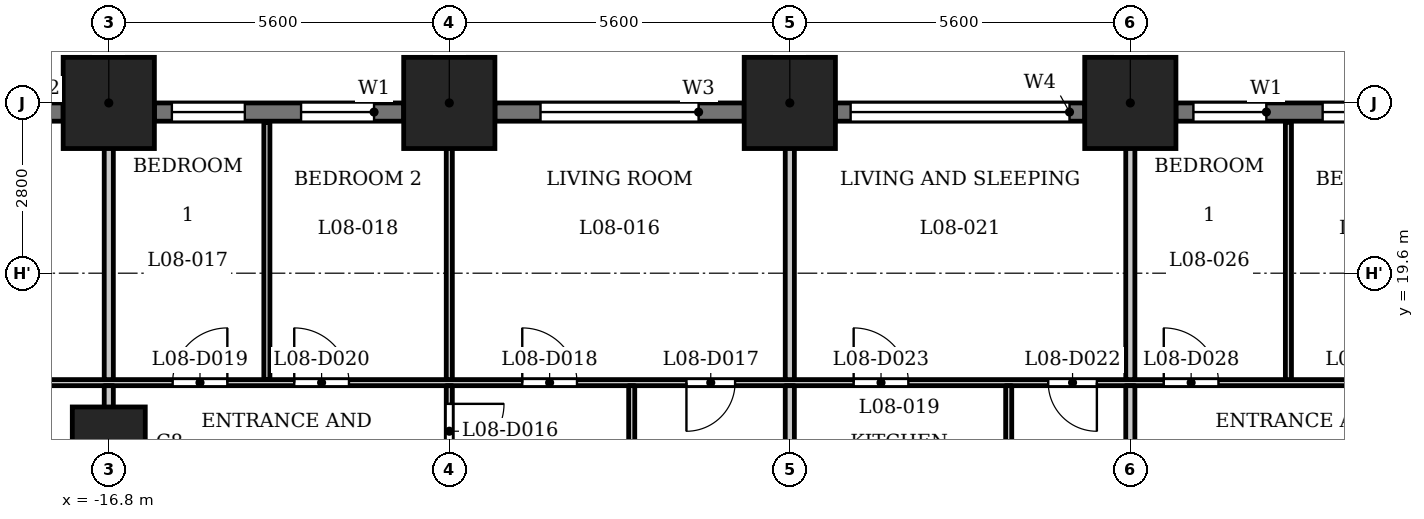
"""IFC4 building model, lengths in metres.
Left out: names, types, materials, properties, quantities, classifications, styles, units other than length and angle.
Written with IfcOpenShell. Run it as: python <this file> out.ifc"""

import sys

from ifc_helpers import new_model, si_unit, direction, frame, frame_2d, origin, origin_2d, place, context, subcontext, project, spatial, rectangle, extrude, element, fill, save


model = new_model("IFC4")
c1 = context("Model", 3, precision=1e-05, world=origin(), true_north=direction((0.0, 1.0)))
c2 = subcontext(c1, "Body", "Model", "MODEL_VIEW")
j1 = project(units=[si_unit("LENGTHUNIT", "METRE"), si_unit("PLANEANGLEUNIT", "RADIAN")], contexts=[c1])
p1 = place(None, origin())
s1 = spatial("IfcSite", under=j1, at=p1, CompositionType="ELEMENT")
p2 = place(p1, origin())
s2 = spatial("IfcBuilding", under=s1, at=p2, CompositionType="ELEMENT")
p3 = place(p2, frame((0.0, 0.0, 37.5)))
s3 = spatial("IfcBuildingStorey", under=s2, at=p3, CompositionType="ELEMENT", Elevation=37.5)
for number, where, z_axis, x_axis in (
    (1, (0.0, 22.4, 0.0), (0.0, 0.0, 1.0), (1.0, 0.0, 0.0)),
    (2, (-5.6, 22.4, 0.0), (0.0, 0.0, 1.0), (1.0, 0.0, 0.0)),
    (3, (-11.2, 22.4, 0.0), (0.0, 0.0, 1.0), (1.0, 0.0, 0.0)),
    (4, (-16.8, 22.4, 0.0), (0.0, 0.0, 1.0), (1.0, 0.0, 0.0)),
):
    element("IfcColumn", number, at=place(p3, frame(where, z_axis=z_axis, x_axis=x_axis)), inside=s3, PredefinedType="COLUMN", context=c2, shape_type="SweptSolid", body=[
        extrude(rectangle(XDim=1.5, YDim=1.5, at=origin_2d()), origin(), (0.0, 0.0, 1.0), 3.5),
    ])
p4 = place(p3, frame((-16.8, 16.8, 0.0), z_axis=(0.0, 0.0, 1.0), x_axis=(1.0, 0.0, 0.0)))
e5 = element("IfcColumn", 5, at=p4, inside=s3, PredefinedType="COLUMN", context=c2, shape_type="SweptSolid", body=[
    extrude(rectangle(XDim=1.2, YDim=1.2, at=origin_2d()), origin(), (0.0, 0.0, 1.0), 3.5),
])
p5 = place(p3, frame((4.85, 22.25, 0.0), z_axis=(0.0, 0.0, 1.0), x_axis=(-1.0, 0.0, 0.0)))
e6 = element("IfcWall", 6, at=p5, inside=s3, PredefinedType="SOLIDWALL", context=c2, shape_type="SweptSolid", body=[
    extrude(rectangle(XDim=4.1, YDim=0.3, at=frame_2d((2.05, 0.0))), origin(), (0.0, 0.0, 1.0), 2.35),
])
p6 = place(p5, frame((0.488, 0.0, 0.6)))
e7 = element("IfcOpeningElement", 7, at=p6, cuts=e6, PredefinedType="OPENING", context=c2, shape_type="SweptSolid", body=[
    extrude(rectangle(XDim=1.2, YDim=1.55, at=frame_2d((0.6, 0.775))), frame((0.0, 0.16, 0.0), z_axis=(0.0, -1.0, 0.0), x_axis=(1.0, 0.0, 0.0)), (0.0, 0.0, 1.0), 0.32),
])
p7 = place(p5, frame((2.613, 0.0, 0.6)))
e8 = element("IfcOpeningElement", 8, at=p7, cuts=e6, PredefinedType="OPENING", context=c2, shape_type="SweptSolid", body=[
    extrude(rectangle(XDim=1.2, YDim=1.55, at=frame_2d((0.6, 0.775))), frame((0.0, 0.16, 0.0), z_axis=(0.0, -1.0, 0.0), x_axis=(1.0, 0.0, 0.0)), (0.0, 0.0, 1.0), 0.32),
])
p8 = place(p3, frame((-0.75, 22.25, 0.0), z_axis=(0.0, 0.0, 1.0), x_axis=(-1.0, 0.0, 0.0)))
e9 = element("IfcWall", 9, at=p8, inside=s3, PredefinedType="SOLIDWALL", context=c2, shape_type="SweptSolid", body=[
    extrude(rectangle(XDim=4.1, YDim=0.3, at=frame_2d((2.05, 0.0))), origin(), (0.0, 0.0, 1.0), 2.35),
])
p9 = place(p8, frame((0.25, 0.0, 1.2)))
e10 = element("IfcOpeningElement", 10, at=p9, cuts=e9, PredefinedType="OPENING", context=c2, shape_type="SweptSolid", body=[
    extrude(rectangle(XDim=3.6, YDim=0.95, at=frame_2d((1.8, 0.475))), frame((0.0, 0.16, 0.0), z_axis=(0.0, -1.0, 0.0), x_axis=(1.0, 0.0, 0.0)), (0.0, 0.0, 1.0), 0.32),
])
p10 = place(p3, frame((-6.35, 22.25, 0.0), z_axis=(0.0, 0.0, 1.0), x_axis=(-1.0, 0.0, 0.0)))
e11 = element("IfcWall", 11, at=p10, inside=s3, PredefinedType="SOLIDWALL", context=c2, shape_type="SweptSolid", body=[
    extrude(rectangle(XDim=4.1, YDim=0.3, at=frame_2d((2.05, 0.0))), origin(), (0.0, 0.0, 1.0), 2.35),
])
p11 = place(p10, frame((0.75, 0.0, 0.9)))
e12 = element("IfcOpeningElement", 12, at=p11, cuts=e11, PredefinedType="OPENING", context=c2, shape_type="SweptSolid", body=[
    extrude(rectangle(XDim=2.6, YDim=1.25, at=frame_2d((1.3, 0.625))), frame((0.0, 0.16, 0.0), z_axis=(0.0, -1.0, 0.0), x_axis=(1.0, 0.0, 0.0)), (0.0, 0.0, 1.0), 0.32),
])
p12 = place(p3, frame((-11.95, 22.25, 0.0), z_axis=(0.0, 0.0, 1.0), x_axis=(-1.0, 0.0, 0.0)))
e13 = element("IfcWall", 13, at=p12, inside=s3, PredefinedType="SOLIDWALL", context=c2, shape_type="SweptSolid", body=[
    extrude(rectangle(XDim=4.1, YDim=0.3, at=frame_2d((2.05, 0.0))), origin(), (0.0, 0.0, 1.0), 2.35),
])
p13 = place(p12, frame((0.488, 0.0, 0.6)))
e14 = element("IfcOpeningElement", 14, at=p13, cuts=e13, PredefinedType="OPENING", context=c2, shape_type="SweptSolid", body=[
    extrude(rectangle(XDim=1.2, YDim=1.55, at=frame_2d((0.6, 0.775))), frame((0.0, 0.16, 0.0), z_axis=(0.0, -1.0, 0.0), x_axis=(1.0, 0.0, 0.0)), (0.0, 0.0, 1.0), 0.32),
])
p14 = place(p12, frame((2.613, 0.0, 0.6)))
e15 = element("IfcOpeningElement", 15, at=p14, cuts=e13, PredefinedType="OPENING", context=c2, shape_type="SweptSolid", body=[
    extrude(rectangle(XDim=1.2, YDim=1.55, at=frame_2d((0.6, 0.775))), frame((0.0, 0.16, 0.0), z_axis=(0.0, -1.0, 0.0), x_axis=(1.0, 0.0, 0.0)), (0.0, 0.0, 1.0), 0.32),
])
p15 = place(p3, frame((-17.55, 22.25, 0.0), z_axis=(0.0, 0.0, 1.0), x_axis=(-1.0, 0.0, 0.0)))
e16 = element("IfcWall", 16, at=p15, inside=s3, PredefinedType="SOLIDWALL", context=c2, shape_type="SweptSolid", body=[
    extrude(rectangle(XDim=2.45, YDim=0.3, at=frame_2d((1.225, 0.0))), origin(), (0.0, 0.0, 1.0), 2.35),
])
p16 = place(p15, frame((0.325, 0.0, 0.9)))
e17 = element("IfcOpeningElement", 17, at=p16, cuts=e16, PredefinedType="OPENING", context=c2, shape_type="SweptSolid", body=[
    extrude(rectangle(XDim=1.8, YDim=1.25, at=frame_2d((0.9, 0.625))), frame((0.0, 0.16, 0.0), z_axis=(0.0, -1.0, 0.0), x_axis=(1.0, 0.0, 0.0)), (0.0, 0.0, 1.0), 0.32),
])
p17 = place(p3, frame((-26.732, 17.8, 0.0), z_axis=(0.0, 0.0, 1.0), x_axis=(1.0, 0.0, 0.0)))
e18 = element("IfcWall", 18, at=p17, inside=s3, PredefinedType="PARTITIONING", context=c2, shape_type="SweptSolid", body=[
    extrude(rectangle(XDim=53.126, YDim=0.1, at=frame_2d((26.563, 0.0))), origin(), (0.0, 0.0, 1.0), 3.2),
])
p18 = place(p17, frame((2.964, 0.0, 0.0)))
e19 = element("IfcOpeningElement", 19, at=p18, cuts=e18, PredefinedType="OPENING", context=c2, shape_type="SweptSolid", body=[
    extrude(rectangle(XDim=0.8, YDim=2.1, at=frame_2d((0.4, 1.05))), frame((0.0, 0.06, 0.0), z_axis=(0.0, -1.0, 0.0), x_axis=(1.0, 0.0, 0.0)), (0.0, 0.0, 1.0), 0.12),
])
p19 = place(p17, frame((7.132, 0.0, 0.0)))
e20 = element("IfcOpeningElement", 20, at=p19, cuts=e18, PredefinedType="OPENING", context=c2, shape_type="SweptSolid", body=[
    extrude(rectangle(XDim=0.9, YDim=2.1, at=frame_2d((0.45, 1.05))), frame((0.0, 0.06, 0.0), z_axis=(0.0, -1.0, 0.0), x_axis=(1.0, 0.0, 0.0)), (0.0, 0.0, 1.0), 0.12),
])
p20 = place(p17, frame((19.432, 0.0, 0.0)))
e21 = element("IfcOpeningElement", 21, at=p20, cuts=e18, PredefinedType="OPENING", context=c2, shape_type="SweptSolid", body=[
    extrude(rectangle(XDim=0.8, YDim=2.1, at=frame_2d((0.4, 1.05))), frame((0.0, 0.06, 0.0), z_axis=(0.0, -1.0, 0.0), x_axis=(1.0, 0.0, 0.0)), (0.0, 0.0, 1.0), 0.12),
])
p21 = place(p17, frame((16.732, 0.0, 0.0)))
e22 = element("IfcOpeningElement", 22, at=p21, cuts=e18, PredefinedType="OPENING", context=c2, shape_type="SweptSolid", body=[
    extrude(rectangle(XDim=0.9, YDim=2.1, at=frame_2d((0.45, 1.05))), frame((0.0, 0.06, 0.0), z_axis=(0.0, -1.0, 0.0), x_axis=(1.0, 0.0, 0.0)), (0.0, 0.0, 1.0), 0.12),
])
p22 = place(p17, frame((10.982, 0.0, 0.0)))
e23 = element("IfcOpeningElement", 23, at=p22, cuts=e18, PredefinedType="OPENING", context=c2, shape_type="SweptSolid", body=[
    extrude(rectangle(XDim=0.9, YDim=2.1, at=frame_2d((0.45, 1.05))), frame((0.0, 0.06, 0.0), z_axis=(0.0, -1.0, 0.0), x_axis=(1.0, 0.0, 0.0)), (0.0, 0.0, 1.0), 0.12),
])
p23 = place(p17, frame((12.982, 0.0, 0.0)))
e24 = element("IfcOpeningElement", 24, at=p23, cuts=e18, PredefinedType="OPENING", context=c2, shape_type="SweptSolid", body=[
    extrude(rectangle(XDim=0.9, YDim=2.1, at=frame_2d((0.45, 1.05))), frame((0.0, 0.06, 0.0), z_axis=(0.0, -1.0, 0.0), x_axis=(1.0, 0.0, 0.0)), (0.0, 0.0, 1.0), 0.12),
])
p24 = place(p17, frame((25.382, 0.0, 0.0)))
e25 = element("IfcOpeningElement", 25, at=p24, cuts=e18, PredefinedType="OPENING", context=c2, shape_type="SweptSolid", body=[
    extrude(rectangle(XDim=0.8, YDim=2.1, at=frame_2d((0.4, 1.05))), frame((0.0, 0.06, 0.0), z_axis=(0.0, -1.0, 0.0), x_axis=(1.0, 0.0, 0.0)), (0.0, 0.0, 1.0), 0.12),
])
p25 = place(p17, frame((22.182, 0.0, 0.0)))
e26 = element("IfcOpeningElement", 26, at=p25, cuts=e18, PredefinedType="OPENING", context=c2, shape_type="SweptSolid", body=[
    extrude(rectangle(XDim=0.9, YDim=2.1, at=frame_2d((0.45, 1.05))), frame((0.0, 0.06, 0.0), z_axis=(0.0, -1.0, 0.0), x_axis=(1.0, 0.0, 0.0)), (0.0, 0.0, 1.0), 0.12),
])
p26 = place(p17, frame((36.232, 0.0, 0.0)))
e27 = element("IfcOpeningElement", 27, at=p26, cuts=e18, PredefinedType="OPENING", context=c2, shape_type="SweptSolid", body=[
    extrude(rectangle(XDim=0.8, YDim=2.1, at=frame_2d((0.4, 1.05))), frame((0.0, 0.06, 0.0), z_axis=(0.0, -1.0, 0.0), x_axis=(1.0, 0.0, 0.0)), (0.0, 0.0, 1.0), 0.12),
])
p27 = place(p17, frame((33.782, 0.0, 0.0)))
e28 = element("IfcOpeningElement", 28, at=p27, cuts=e18, PredefinedType="OPENING", context=c2, shape_type="SweptSolid", body=[
    extrude(rectangle(XDim=0.9, YDim=2.1, at=frame_2d((0.45, 1.05))), frame((0.0, 0.06, 0.0), z_axis=(0.0, -1.0, 0.0), x_axis=(1.0, 0.0, 0.0)), (0.0, 0.0, 1.0), 0.12),
])
p28 = place(p17, frame((27.282, 0.0, 0.0)))
e29 = element("IfcOpeningElement", 29, at=p28, cuts=e18, PredefinedType="OPENING", context=c2, shape_type="SweptSolid", body=[
    extrude(rectangle(XDim=0.9, YDim=2.1, at=frame_2d((0.45, 1.05))), frame((0.0, 0.06, 0.0), z_axis=(0.0, -1.0, 0.0), x_axis=(1.0, 0.0, 0.0)), (0.0, 0.0, 1.0), 0.12),
])
p29 = place(p17, frame((30.282, 0.0, 0.0)))
e30 = element("IfcOpeningElement", 30, at=p29, cuts=e18, PredefinedType="OPENING", context=c2, shape_type="SweptSolid", body=[
    extrude(rectangle(XDim=0.9, YDim=2.1, at=frame_2d((0.45, 1.05))), frame((0.0, 0.06, 0.0), z_axis=(0.0, -1.0, 0.0), x_axis=(1.0, 0.0, 0.0)), (0.0, 0.0, 1.0), 0.12),
])
p30 = place(p17, frame((38.582, 0.0, 0.0)))
e31 = element("IfcOpeningElement", 31, at=p30, cuts=e18, PredefinedType="OPENING", context=c2, shape_type="SweptSolid", body=[
    extrude(rectangle(XDim=0.8, YDim=2.1, at=frame_2d((0.4, 1.05))), frame((0.0, 0.06, 0.0), z_axis=(0.0, -1.0, 0.0), x_axis=(1.0, 0.0, 0.0)), (0.0, 0.0, 1.0), 0.12),
])
p31 = place(p17, frame((41.232, 0.0, 0.0)))
e32 = element("IfcOpeningElement", 32, at=p31, cuts=e18, PredefinedType="OPENING", context=c2, shape_type="SweptSolid", body=[
    extrude(rectangle(XDim=0.9, YDim=2.1, at=frame_2d((0.45, 1.05))), frame((0.0, 0.06, 0.0), z_axis=(0.0, -1.0, 0.0), x_axis=(1.0, 0.0, 0.0)), (0.0, 0.0, 1.0), 0.12),
])
p32 = place(p17, frame((51.532, 0.0, 0.0)))
e33 = element("IfcOpeningElement", 33, at=p32, cuts=e18, PredefinedType="OPENING", context=c2, shape_type="SweptSolid", body=[
    extrude(rectangle(XDim=0.8, YDim=2.1, at=frame_2d((0.4, 1.05))), frame((0.0, 0.06, 0.0), z_axis=(0.0, -1.0, 0.0), x_axis=(1.0, 0.0, 0.0)), (0.0, 0.0, 1.0), 0.12),
])
p33 = place(p17, frame((46.582, 0.0, 0.0)))
e34 = element("IfcOpeningElement", 34, at=p33, cuts=e18, PredefinedType="OPENING", context=c2, shape_type="SweptSolid", body=[
    extrude(rectangle(XDim=0.9, YDim=2.1, at=frame_2d((0.45, 1.05))), frame((0.0, 0.06, 0.0), z_axis=(0.0, -1.0, 0.0), x_axis=(1.0, 0.0, 0.0)), (0.0, 0.0, 1.0), 0.12),
])
p34 = place(p3, frame((-16.8, 15.475, 0.0), z_axis=(0.0, 0.0, 1.0), x_axis=(0.0, 1.0, 0.0)))
e35 = element("IfcWall", 35, at=p34, inside=s3, PredefinedType="PARTITIONING", context=c2, shape_type="SweptSolid", body=[
    extrude(rectangle(XDim=2.275, YDim=0.15, at=frame_2d((1.137, 0.0))), origin(), (0.0, 0.0, 1.0), 3.2),
])
p35 = place(p3, frame((-16.8, 17.85, 0.0), z_axis=(0.0, 0.0, 1.0), x_axis=(0.0, 1.0, 0.0)))
e36 = element("IfcWall", 36, at=p35, inside=s3, PredefinedType="PARTITIONING", context=c2, shape_type="SweptSolid", body=[
    extrude(rectangle(XDim=5.28, YDim=0.15, at=frame_2d((2.64, 0.0))), origin(), (0.0, 0.0, 1.0), 3.2),
])
p36 = place(p3, frame((-14.2, 17.85, 0.0), z_axis=(0.0, 0.0, 1.0), x_axis=(0.0, 1.0, 0.0)))
e37 = element("IfcWall", 37, at=p36, inside=s3, PredefinedType="PARTITIONING", context=c2, shape_type="SweptSolid", body=[
    extrude(rectangle(XDim=4.23, YDim=0.1, at=frame_2d((2.115, 0.0))), origin(), (0.0, 0.0, 1.0), 3.2),
])
p37 = place(p3, frame((-11.2, 15.475, 0.0), z_axis=(0.0, 0.0, 1.0), x_axis=(0.0, 1.0, 0.0)))
e38 = element("IfcWall", 38, at=p37, inside=s3, PredefinedType="PARTITIONING", context=c2, shape_type="SweptSolid", body=[
    extrude(rectangle(XDim=2.275, YDim=0.1, at=frame_2d((1.137, 0.0))), origin(), (0.0, 0.0, 1.0), 3.2),
])
p38 = place(p37, frame((1.076, 0.0, 0.0)))
e39 = element("IfcOpeningElement", 39, at=p38, cuts=e38, PredefinedType="OPENING", context=c2, shape_type="SweptSolid", body=[
    extrude(rectangle(XDim=0.9, YDim=2.1, at=frame_2d((0.45, 1.05))), frame((0.0, 0.06, 0.0), z_axis=(0.0, -1.0, 0.0), x_axis=(1.0, 0.0, 0.0)), (0.0, 0.0, 1.0), 0.12),
])
p39 = place(p3, frame((-11.2, 17.85, 0.0), z_axis=(0.0, 0.0, 1.0), x_axis=(0.0, 1.0, 0.0)))
e40 = element("IfcWall", 40, at=p39, inside=s3, PredefinedType="PARTITIONING", context=c2, shape_type="SweptSolid", body=[
    extrude(rectangle(XDim=5.28, YDim=0.1, at=frame_2d((2.64, 0.0))), origin(), (0.0, 0.0, 1.0), 3.2),
])
p40 = place(p3, frame((-8.2, 15.475, 0.0), z_axis=(0.0, 0.0, 1.0), x_axis=(0.0, 1.0, 0.0)))
e41 = element("IfcWall", 41, at=p40, inside=s3, PredefinedType="PARTITIONING", context=c2, shape_type="SweptSolid", body=[
    extrude(rectangle(XDim=2.275, YDim=0.1, at=frame_2d((1.137, 0.0))), origin(), (0.0, 0.0, 1.0), 3.2),
])
p41 = place(p3, frame((-5.6, 15.475, 0.0), z_axis=(0.0, 0.0, 1.0), x_axis=(0.0, 1.0, 0.0)))
e42 = element("IfcWall", 42, at=p41, inside=s3, PredefinedType="PARTITIONING", context=c2, shape_type="SweptSolid", body=[
    extrude(rectangle(XDim=2.275, YDim=0.15, at=frame_2d((1.137, 0.0))), origin(), (0.0, 0.0, 1.0), 3.2),
])
p42 = place(p3, frame((-5.6, 17.85, 0.0), z_axis=(0.0, 0.0, 1.0), x_axis=(0.0, 1.0, 0.0)))
e43 = element("IfcWall", 43, at=p42, inside=s3, PredefinedType="PARTITIONING", context=c2, shape_type="SweptSolid", body=[
    extrude(rectangle(XDim=5.28, YDim=0.15, at=frame_2d((2.64, 0.0))), origin(), (0.0, 0.0, 1.0), 3.2),
])
p43 = place(p3, frame((-2.0, 15.475, 0.0), z_axis=(0.0, 0.0, 1.0), x_axis=(0.0, 1.0, 0.0)))
e44 = element("IfcWall", 44, at=p43, inside=s3, PredefinedType="PARTITIONING", context=c2, shape_type="SweptSolid", body=[
    extrude(rectangle(XDim=2.275, YDim=0.1, at=frame_2d((1.137, 0.0))), origin(), (0.0, 0.0, 1.0), 3.2),
])
p44 = place(p3, frame((0.0, 15.475, 0.0), z_axis=(0.0, 0.0, 1.0), x_axis=(0.0, 1.0, 0.0)))
e45 = element("IfcWall", 45, at=p44, inside=s3, PredefinedType="PARTITIONING", context=c2, shape_type="SweptSolid", body=[
    extrude(rectangle(XDim=2.275, YDim=0.15, at=frame_2d((1.137, 0.0))), origin(), (0.0, 0.0, 1.0), 3.2),
])
p45 = place(p3, frame((0.0, 17.85, 0.0), z_axis=(0.0, 0.0, 1.0), x_axis=(0.0, 1.0, 0.0)))
e46 = element("IfcWall", 46, at=p45, inside=s3, PredefinedType="PARTITIONING", context=c2, shape_type="SweptSolid", body=[
    extrude(rectangle(XDim=5.28, YDim=0.15, at=frame_2d((2.64, 0.0))), origin(), (0.0, 0.0, 1.0), 3.2),
])
p46 = place(p3, frame((2.6, 17.85, 0.0), z_axis=(0.0, 0.0, 1.0), x_axis=(0.0, 1.0, 0.0)))
e47 = element("IfcWall", 47, at=p46, inside=s3, PredefinedType="PARTITIONING", context=c2, shape_type="SweptSolid", body=[
    extrude(rectangle(XDim=4.23, YDim=0.1, at=frame_2d((2.115, 0.0))), origin(), (0.0, 0.0, 1.0), 3.2),
])
p47 = place(p38, origin())
e48 = element("IfcDoor", 48, at=p47, inside=s3, OperationType="SINGLE_SWING_RIGHT", PredefinedType="DOOR", context=c2, shape_type="SweptSolid", body=[
    extrude(rectangle(XDim=0.9, YDim=2.1, at=frame_2d((0.45, 1.05))), frame((0.0, 0.025, 0.0), z_axis=(0.0, -1.0, 0.0), x_axis=(1.0, 0.0, 0.0)), (0.0, 0.0, 1.0), 0.05),
])
fill(e39, e48)
p48 = place(p20, origin())
e49 = element("IfcDoor", 49, at=p48, inside=s3, OperationType="SINGLE_SWING_LEFT", PredefinedType="DOOR", context=c2, shape_type="SweptSolid", body=[
    extrude(rectangle(XDim=0.8, YDim=2.1, at=frame_2d((0.4, 1.05))), frame((0.0, 0.025, 0.0), z_axis=(0.0, -1.0, 0.0), x_axis=(1.0, 0.0, 0.0)), (0.0, 0.0, 1.0), 0.05),
])
fill(e21, e49)
p49 = place(p21, origin())
e50 = element("IfcDoor", 50, at=p49, inside=s3, OperationType="SINGLE_SWING_RIGHT", PredefinedType="DOOR", context=c2, shape_type="SweptSolid", body=[
    extrude(rectangle(XDim=0.9, YDim=2.1, at=frame_2d((0.45, 1.05))), frame((0.0, 0.025, 0.0), z_axis=(0.0, -1.0, 0.0), x_axis=(1.0, 0.0, 0.0)), (0.0, 0.0, 1.0), 0.05),
])
fill(e22, e50)
p50 = place(p22, origin())
e51 = element("IfcDoor", 51, at=p50, inside=s3, OperationType="SINGLE_SWING_LEFT", PredefinedType="DOOR", context=c2, shape_type="SweptSolid", body=[
    extrude(rectangle(XDim=0.9, YDim=2.1, at=frame_2d((0.45, 1.05))), frame((0.0, 0.025, 0.0), z_axis=(0.0, -1.0, 0.0), x_axis=(1.0, 0.0, 0.0)), (0.0, 0.0, 1.0), 0.05),
])
fill(e23, e51)
p51 = place(p23, origin())
e52 = element("IfcDoor", 52, at=p51, inside=s3, OperationType="SINGLE_SWING_RIGHT", PredefinedType="DOOR", context=c2, shape_type="SweptSolid", body=[
    extrude(rectangle(XDim=0.9, YDim=2.1, at=frame_2d((0.45, 1.05))), frame((0.0, 0.025, 0.0), z_axis=(0.0, -1.0, 0.0), x_axis=(1.0, 0.0, 0.0)), (0.0, 0.0, 1.0), 0.05),
])
fill(e24, e52)
p52 = place(p24, origin())
e53 = element("IfcDoor", 53, at=p52, inside=s3, OperationType="SINGLE_SWING_RIGHT", PredefinedType="DOOR", context=c2, shape_type="SweptSolid", body=[
    extrude(rectangle(XDim=0.8, YDim=2.1, at=frame_2d((0.4, 1.05))), frame((0.0, 0.025, 0.0), z_axis=(0.0, -1.0, 0.0), x_axis=(1.0, 0.0, 0.0)), (0.0, 0.0, 1.0), 0.05),
])
fill(e25, e53)
p53 = place(p25, origin())
e54 = element("IfcDoor", 54, at=p53, inside=s3, OperationType="SINGLE_SWING_RIGHT", PredefinedType="DOOR", context=c2, shape_type="SweptSolid", body=[
    extrude(rectangle(XDim=0.9, YDim=2.1, at=frame_2d((0.45, 1.05))), frame((0.0, 0.025, 0.0), z_axis=(0.0, -1.0, 0.0), x_axis=(1.0, 0.0, 0.0)), (0.0, 0.0, 1.0), 0.05),
])
fill(e26, e54)
p54 = place(p28, origin())
e55 = element("IfcDoor", 55, at=p54, inside=s3, OperationType="SINGLE_SWING_RIGHT", PredefinedType="DOOR", context=c2, shape_type="SweptSolid", body=[
    extrude(rectangle(XDim=0.9, YDim=2.1, at=frame_2d((0.45, 1.05))), frame((0.0, 0.025, 0.0), z_axis=(0.0, -1.0, 0.0), x_axis=(1.0, 0.0, 0.0)), (0.0, 0.0, 1.0), 0.05),
])
fill(e29, e55)
p55 = place(p6, origin())
e56 = element("IfcWindow", 56, at=p55, inside=s3, PartitioningType="SINGLE_PANEL", PredefinedType="WINDOW", context=c2, shape_type="SweptSolid", body=[
    extrude(rectangle(XDim=1.2, YDim=1.55, at=frame_2d((0.6, 0.775))), frame((0.0, 0.03, 0.0), z_axis=(0.0, -1.0, 0.0), x_axis=(1.0, 0.0, 0.0)), (0.0, 0.0, 1.0), 0.06),
])
fill(e7, e56)
p56 = place(p7, origin())
e57 = element("IfcWindow", 57, at=p56, inside=s3, PartitioningType="SINGLE_PANEL", PredefinedType="WINDOW", context=c2, shape_type="SweptSolid", body=[
    extrude(rectangle(XDim=1.2, YDim=1.55, at=frame_2d((0.6, 0.775))), frame((0.0, 0.03, 0.0), z_axis=(0.0, -1.0, 0.0), x_axis=(1.0, 0.0, 0.0)), (0.0, 0.0, 1.0), 0.06),
])
fill(e8, e57)
p57 = place(p9, origin())
e58 = element("IfcWindow", 58, at=p57, inside=s3, PartitioningType="SINGLE_PANEL", PredefinedType="WINDOW", context=c2, shape_type="SweptSolid", body=[
    extrude(rectangle(XDim=3.6, YDim=0.95, at=frame_2d((1.8, 0.475))), frame((0.0, 0.03, 0.0), z_axis=(0.0, -1.0, 0.0), x_axis=(1.0, 0.0, 0.0)), (0.0, 0.0, 1.0), 0.06),
])
fill(e10, e58)
p58 = place(p11, origin())
e59 = element("IfcWindow", 59, at=p58, inside=s3, PartitioningType="SINGLE_PANEL", PredefinedType="WINDOW", context=c2, shape_type="SweptSolid", body=[
    extrude(rectangle(XDim=2.6, YDim=1.25, at=frame_2d((1.3, 0.625))), frame((0.0, 0.03, 0.0), z_axis=(0.0, -1.0, 0.0), x_axis=(1.0, 0.0, 0.0)), (0.0, 0.0, 1.0), 0.06),
])
fill(e12, e59)
p59 = place(p13, origin())
e60 = element("IfcWindow", 60, at=p59, inside=s3, PartitioningType="SINGLE_PANEL", PredefinedType="WINDOW", context=c2, shape_type="SweptSolid", body=[
    extrude(rectangle(XDim=1.2, YDim=1.55, at=frame_2d((0.6, 0.775))), frame((0.0, 0.03, 0.0), z_axis=(0.0, -1.0, 0.0), x_axis=(1.0, 0.0, 0.0)), (0.0, 0.0, 1.0), 0.06),
])
fill(e14, e60)
p60 = place(p14, origin())
e61 = element("IfcWindow", 61, at=p60, inside=s3, PartitioningType="SINGLE_PANEL", PredefinedType="WINDOW", context=c2, shape_type="SweptSolid", body=[
    extrude(rectangle(XDim=1.2, YDim=1.55, at=frame_2d((0.6, 0.775))), frame((0.0, 0.03, 0.0), z_axis=(0.0, -1.0, 0.0), x_axis=(1.0, 0.0, 0.0)), (0.0, 0.0, 1.0), 0.06),
])
fill(e15, e61)
save(model, sys.argv[1])
